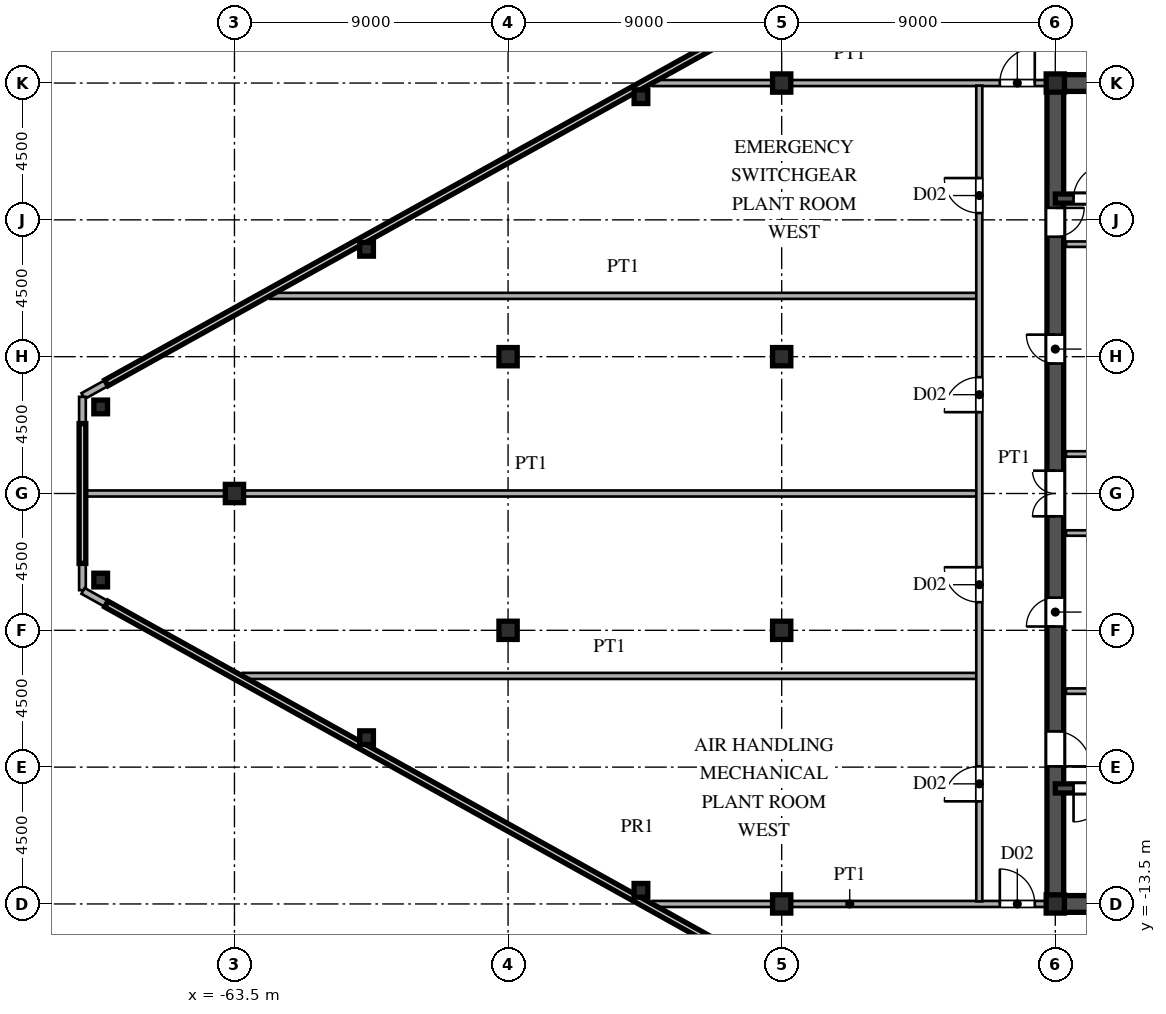
"""IFC4 building model, lengths in metres.
Left out: names, types, materials, properties, quantities, classifications, styles, units other than length and angle.
Written with IfcOpenShell. Run it as: python <this file> out.ifc"""

import sys

from ifc_helpers import new_model, si_unit, direction, frame, frame_2d, origin, origin_2d, place, context, subcontext, project, spatial, rectangle, hollow_rectangle, i_section, extrude, source, transform, mapped, element, fill, save


model = new_model("IFC4")
c1 = context("Model", 3, precision=1e-05, world=origin(), true_north=direction((0.0, 1.0)))
c2 = subcontext(c1, "Body", "Model", "MODEL_VIEW")
j1 = project(units=[si_unit("LENGTHUNIT", "METRE"), si_unit("PLANEANGLEUNIT", "RADIAN")], contexts=[c1])
p1 = place(None, origin())
s1 = spatial("IfcSite", under=j1, at=p1, CompositionType="ELEMENT")
p2 = place(p1, origin())
s2 = spatial("IfcBuilding", under=s1, at=p2, CompositionType="ELEMENT")
p3 = place(p2, frame((0.0, 0.0, 162.0)))
s3 = spatial("IfcBuildingStorey", under=s2, at=p3, CompositionType="ELEMENT", Elevation=162.0)
m1 = source(origin(), c2, "Body", "SweptSolid", [
    extrude(i_section(OverallWidth=0.6, OverallDepth=0.6, WebThickness=0.025, FlangeThickness=0.04, at=origin_2d()), origin(), (0.0, 0.0, 1.0), 5.1),
])
for number, where, z_axis, x_axis in (
    (1, (-36.5, -13.5, 0.0), (0.0, 0.0, 1.0), (1.0, 0.0, 0.0)),
    (2, (-36.5, 13.5, 0.0), (0.0, 0.0, 1.0), (1.0, 0.0, 0.0)),
    (3, (-45.5, -13.5, 0.0), (0.0, 0.0, 1.0), (1.0, 0.0, 0.0)),
    (4, (-45.5, -4.5, 0.0), (0.0, 0.0, 1.0), (1.0, 0.0, 0.0)),
    (5, (-45.5, 4.5, 0.0), (0.0, 0.0, 1.0), (1.0, 0.0, 0.0)),
    (6, (-45.5, 13.5, 0.0), (0.0, 0.0, 1.0), (1.0, 0.0, 0.0)),
    (7, (-54.5, -4.5, 0.0), (0.0, 0.0, 1.0), (1.0, 0.0, 0.0)),
    (8, (-54.5, 4.5, 0.0), (0.0, 0.0, 1.0), (1.0, 0.0, 0.0)),
    (9, (-63.5, 0.0, 0.0), (0.0, 0.0, 1.0), (1.0, 0.0, 0.0)),
):
    element("IfcColumn", number, at=place(p3, frame(where, z_axis=z_axis, x_axis=x_axis)), inside=s3, PredefinedType="COLUMN", context=c2, shape_type="MappedRepresentation", body=[
        mapped(m1, transform((0.0, 0.0, 0.0), scale=1.0)),
    ])
m2 = source(origin(), c2, "Body", "SweptSolid", [
    extrude(hollow_rectangle(XDim=0.45, YDim=0.45, WallThickness=0.018, at=origin_2d()), origin(), (0.0, 0.0, 1.0), 5.1),
])
for number, where, z_axis, x_axis in (
    (10, (-67.9, 2.847, 0.0), (0.0, 0.0, 1.0), (1.0, 0.0, 0.0)),
    (11, (-67.9, -2.847, 0.0), (0.0, 0.0, 1.0), (1.0, 0.0, 0.0)),
    (12, (-50.129, -13.051, 0.0), (0.0, 0.0, 1.0), (1.0, 0.0, 0.0)),
    (13, (-59.155, -8.031, 0.0), (0.0, 0.0, 1.0), (1.0, 0.0, 0.0)),
    (14, (-50.129, 13.051, 0.0), (0.0, 0.0, 1.0), (1.0, 0.0, 0.0)),
    (15, (-59.155, 8.031, 0.0), (0.0, 0.0, 1.0), (1.0, 0.0, 0.0)),
):
    element("IfcColumn", number, at=place(p3, frame(where, z_axis=z_axis, x_axis=x_axis)), inside=s3, PredefinedType="COLUMN", context=c2, shape_type="MappedRepresentation", body=[
        mapped(m2, transform((0.0, 0.0, 0.0), scale=1.0)),
    ])
p4 = place(p3, frame((-32.018, 23.49, 0.0), z_axis=(0.0, 0.0, 1.0), x_axis=(-0.873930586172, -0.486050748947, 0.0)))
e16 = element("IfcWall", 16, at=p4, inside=s3, PredefinedType="PARAPET", context=c2, shape_type="SweptSolid", body=[
    extrude(rectangle(XDim=41.725, YDim=0.22, at=frame_2d((20.863, 0.0))), origin(), (0.0, 0.0, 1.0), 1.25),
])
p5 = place(p3, frame((-68.5, 3.18, 0.0), z_axis=(0.0, 0.0, 1.0), x_axis=(0.0, -1.0, 0.0)))
e17 = element("IfcWall", 17, at=p5, inside=s3, PredefinedType="PARAPET", context=c2, shape_type="SweptSolid", body=[
    extrude(rectangle(XDim=6.36, YDim=0.22, at=frame_2d((3.18, 0.0))), origin(), (0.0, 0.0, 1.0), 1.25),
])
p6 = place(p3, frame((-68.482, -3.21, 0.0), z_axis=(0.0, 0.0, 1.0), x_axis=(0.873930586172, -0.486050748947, 0.0)))
e18 = element("IfcWall", 18, at=p6, inside=s3, PredefinedType="PARAPET", context=c2, shape_type="SweptSolid", body=[
    extrude(rectangle(XDim=41.725, YDim=0.22, at=frame_2d((20.863, 0.0))), origin(), (0.0, 0.0, 1.0), 1.25),
])
for number, where, z_axis, x_axis in (
    (19, (-36.5, -13.5, 0.0), (0.0, 0.0, 1.0), (1.0, 0.0, 0.0)),
    (20, (-36.5, 13.5, 0.0), (0.0, 0.0, 1.0), (1.0, 0.0, 0.0)),
):
    element("IfcWall", number, at=place(p3, frame(where, z_axis=z_axis, x_axis=x_axis)), inside=s3, PredefinedType="SHEAR", context=c2, shape_type="SweptSolid", body=[
        extrude(rectangle(XDim=9.0, YDim=0.55, at=frame_2d((4.5, 0.0))), origin(), (0.0, 0.0, 1.0), 4.88),
    ])
p7 = place(p3, frame((-36.5, -13.65, 0.0), z_axis=(0.0, 0.0, 1.0), x_axis=(0.0, 1.0, 0.0)))
e21 = element("IfcWall", 21, at=p7, inside=s3, PredefinedType="SHEAR", context=c2, shape_type="SweptSolid", body=[
    extrude(rectangle(XDim=7.15, YDim=0.55, at=frame_2d((3.575, 0.0))), origin(), (0.0, 0.0, 1.0), 4.88),
])
p8 = place(p7, frame((4.675, 0.0, 0.0)))
e22 = element("IfcOpeningElement", 22, at=p8, cuts=e21, PredefinedType="OPENING", context=c2, shape_type="SweptSolid", body=[
    extrude(rectangle(XDim=1.15, YDim=2.2, at=frame_2d((0.575, 1.1))), frame((0.0, 0.285, 0.0), z_axis=(0.0, -1.0, 0.0), x_axis=(1.0, 0.0, 0.0)), (0.0, 0.0, 1.0), 0.57),
])
p9 = place(p3, frame((-36.5, -1.3, 0.0), z_axis=(0.0, 0.0, 1.0), x_axis=(0.0, 1.0, 0.0)))
e23 = element("IfcWall", 23, at=p9, inside=s3, PredefinedType="SHEAR", context=c2, shape_type="SweptSolid", body=[
    extrude(rectangle(XDim=2.6, YDim=0.55, at=frame_2d((1.3, 0.0))), origin(), (0.0, 0.0, 1.0), 4.88),
])
p10 = place(p9, frame((0.55, 0.0, 0.0)))
e24 = element("IfcOpeningElement", 24, at=p10, cuts=e23, PredefinedType="OPENING", context=c2, shape_type="SweptSolid", body=[
    extrude(rectangle(XDim=1.5, YDim=2.3, at=frame_2d((0.75, 1.15))), frame((0.0, 0.285, 0.0), z_axis=(0.0, -1.0, 0.0), x_axis=(1.0, 0.0, 0.0)), (0.0, 0.0, 1.0), 0.57),
])
p11 = place(p3, frame((-36.5, 8.2, 0.0), z_axis=(0.0, 0.0, 1.0), x_axis=(0.0, 1.0, 0.0)))
e25 = element("IfcWall", 25, at=p11, inside=s3, PredefinedType="SHEAR", context=c2, shape_type="SweptSolid", body=[
    extrude(rectangle(XDim=5.45, YDim=0.55, at=frame_2d((2.725, 0.0))), origin(), (0.0, 0.0, 1.0), 4.88),
])
p12 = place(p11, frame((0.245, 0.0, 0.0)))
e26 = element("IfcOpeningElement", 26, at=p12, cuts=e25, PredefinedType="OPENING", context=c2, shape_type="SweptSolid", body=[
    extrude(rectangle(XDim=0.95, YDim=2.15, at=frame_2d((0.475, 1.075))), frame((0.0, 0.285, 0.0), z_axis=(0.0, -1.0, 0.0), x_axis=(1.0, 0.0, 0.0)), (0.0, 0.0, 1.0), 0.57),
])
p13 = place(p3, frame((-36.5, -6.5, 0.0), z_axis=(0.0, 0.0, 1.0), x_axis=(0.0, 1.0, 0.0)))
e27 = element("IfcWall", 27, at=p13, inside=s3, PredefinedType="SHEAR", context=c2, shape_type="SweptSolid", body=[
    extrude(rectangle(XDim=5.2, YDim=0.55, at=frame_2d((2.6, 0.0))), origin(), (0.0, 0.0, 1.0), 4.88),
])
p14 = place(p13, frame((2.125, 0.0, 0.0)))
e28 = element("IfcOpeningElement", 28, at=p14, cuts=e27, PredefinedType="OPENING", context=c2, shape_type="SweptSolid", body=[
    extrude(rectangle(XDim=0.95, YDim=2.15, at=frame_2d((0.475, 1.075))), frame((0.0, 0.285, 0.0), z_axis=(0.0, -1.0, 0.0), x_axis=(1.0, 0.0, 0.0)), (0.0, 0.0, 1.0), 0.57),
])
p15 = place(p3, frame((-36.5, 1.3, 0.0), z_axis=(0.0, 0.0, 1.0), x_axis=(0.0, 1.0, 0.0)))
e29 = element("IfcWall", 29, at=p15, inside=s3, PredefinedType="SHEAR", context=c2, shape_type="SweptSolid", body=[
    extrude(rectangle(XDim=6.9, YDim=0.55, at=frame_2d((3.45, 0.0))), origin(), (0.0, 0.0, 1.0), 4.88),
])
p16 = place(p15, frame((2.975, 0.0, 0.0)))
e30 = element("IfcOpeningElement", 30, at=p16, cuts=e29, PredefinedType="OPENING", context=c2, shape_type="SweptSolid", body=[
    extrude(rectangle(XDim=0.95, YDim=2.15, at=frame_2d((0.475, 1.075))), frame((0.0, 0.285, 0.0), z_axis=(0.0, -1.0, 0.0), x_axis=(1.0, 0.0, 0.0)), (0.0, 0.0, 1.0), 0.57),
])
p17 = place(p3, frame((-36.5, -9.7, 0.0), z_axis=(0.0, 0.0, 1.0), x_axis=(1.0, 0.0, 0.0)))
e31 = element("IfcWall", 31, at=p17, inside=s3, PredefinedType="SHEAR", context=c2, shape_type="SweptSolid", body=[
    extrude(rectangle(XDim=9.0, YDim=0.3, at=frame_2d((4.5, 0.0))), origin(), (0.0, 0.0, 1.0), 4.88),
])
p18 = place(p17, frame((0.6, 0.0, 0.0)))
e32 = element("IfcOpeningElement", 32, at=p18, cuts=e31, PredefinedType="OPENING", context=c2, shape_type="SweptSolid", body=[
    extrude(rectangle(XDim=1.1, YDim=2.2, at=frame_2d((0.55, 1.1))), frame((0.0, 0.16, 0.0), z_axis=(0.0, -1.0, 0.0), x_axis=(1.0, 0.0, 0.0)), (0.0, 0.0, 1.0), 0.32),
])
p19 = place(p3, frame((-36.5, 9.7, 0.0), z_axis=(0.0, 0.0, 1.0), x_axis=(1.0, 0.0, 0.0)))
e33 = element("IfcWall", 33, at=p19, inside=s3, PredefinedType="SHEAR", context=c2, shape_type="SweptSolid", body=[
    extrude(rectangle(XDim=9.0, YDim=0.3, at=frame_2d((4.5, 0.0))), origin(), (0.0, 0.0, 1.0), 4.88),
])
p20 = place(p19, frame((0.6, 0.0, 0.0)))
e34 = element("IfcOpeningElement", 34, at=p20, cuts=e33, PredefinedType="OPENING", context=c2, shape_type="SweptSolid", body=[
    extrude(rectangle(XDim=1.1, YDim=2.2, at=frame_2d((0.55, 1.1))), frame((0.0, 0.16, 0.0), z_axis=(0.0, -1.0, 0.0), x_axis=(1.0, 0.0, 0.0)), (0.0, 0.0, 1.0), 0.32),
])
for number, where, z_axis, x_axis in (
    (35, (-36.15, -6.5, 0.0), (0.0, 0.0, 1.0), (1.0, 0.0, 0.0)),
    (36, (-36.15, 8.2, 0.0), (0.0, 0.0, 1.0), (1.0, 0.0, 0.0)),
):
    element("IfcWall", number, at=place(p3, frame(where, z_axis=z_axis, x_axis=x_axis)), inside=s3, PredefinedType="PARTITIONING", context=c2, shape_type="SweptSolid", body=[
        extrude(rectangle(XDim=5.7, YDim=0.18, at=frame_2d((2.85, 0.0))), origin(), (0.0, 0.0, 1.0), 4.88),
    ])
for number, where, z_axis, x_axis in (
    (37, (-36.15, -1.3, 0.0), (0.0, 0.0, 1.0), (1.0, 0.0, 0.0)),
    (38, (-36.15, 1.3, 0.0), (0.0, 0.0, 1.0), (1.0, 0.0, 0.0)),
):
    element("IfcWall", number, at=place(p3, frame(where, z_axis=z_axis, x_axis=x_axis)), inside=s3, PredefinedType="PARTITIONING", context=c2, shape_type="SweptSolid", body=[
        extrude(rectangle(XDim=2.95, YDim=0.18, at=frame_2d((1.475, 0.0))), origin(), (0.0, 0.0, 1.0), 4.88),
    ])
p21 = place(p3, frame((-49.744, -13.5, 0.0), z_axis=(0.0, 0.0, 1.0), x_axis=(1.0, 0.0, 0.0)))
e39 = element("IfcWall", 39, at=p21, inside=s3, PredefinedType="PARTITIONING", context=c2, shape_type="SweptSolid", body=[
    extrude(rectangle(XDim=2.156, YDim=0.2, at=frame_2d((1.078, 0.0))), origin(), (0.0, 0.0, 1.0), 4.88),
])
p22 = place(p3, frame((-47.587, -13.5, 0.0), z_axis=(0.0, 0.0, 1.0), x_axis=(1.0, 0.0, 0.0)))
e40 = element("IfcWall", 40, at=p22, inside=s3, PredefinedType="PARTITIONING", context=c2, shape_type="SweptSolid", body=[
    extrude(rectangle(XDim=10.807, YDim=0.2, at=frame_2d((5.404, 0.0))), origin(), (0.0, 0.0, 1.0), 4.28),
])
p23 = place(p22, frame((9.262, 0.0, 0.0)))
e41 = element("IfcOpeningElement", 41, at=p23, cuts=e40, PredefinedType="OPENING", context=c2, shape_type="SweptSolid", body=[
    extrude(rectangle(XDim=1.15, YDim=2.2, at=frame_2d((0.575, 1.1))), frame((0.0, 0.11, 0.0), z_axis=(0.0, -1.0, 0.0), x_axis=(1.0, 0.0, 0.0)), (0.0, 0.0, 1.0), 0.22),
])
p24 = place(p3, frame((-63.229, -6.0, 0.0), z_axis=(0.0, 0.0, 1.0), x_axis=(1.0, 0.0, 0.0)))
e42 = element("IfcWall", 42, at=p24, inside=s3, PredefinedType="PARTITIONING", context=c2, shape_type="SweptSolid", body=[
    extrude(rectangle(XDim=24.144, YDim=0.2, at=frame_2d((12.072, 0.0))), origin(), (0.0, 0.0, 1.0), 4.88),
])
p25 = place(p3, frame((-68.385, 0.0, 0.0), z_axis=(0.0, 0.0, 1.0), x_axis=(1.0, 0.0, 0.0)))
e43 = element("IfcWall", 43, at=p25, inside=s3, PredefinedType="PARTITIONING", context=c2, shape_type="SweptSolid", body=[
    extrude(rectangle(XDim=29.3, YDim=0.2, at=frame_2d((14.65, 0.0))), origin(), (0.0, 0.0, 1.0), 4.88),
])
p26 = place(p3, frame((-62.33, 6.5, 0.0), z_axis=(0.0, 0.0, 1.0), x_axis=(1.0, 0.0, 0.0)))
e44 = element("IfcWall", 44, at=p26, inside=s3, PredefinedType="PARTITIONING", context=c2, shape_type="SweptSolid", body=[
    extrude(rectangle(XDim=23.245, YDim=0.2, at=frame_2d((11.623, 0.0))), origin(), (0.0, 0.0, 1.0), 4.88),
])
p27 = place(p3, frame((-49.744, 13.5, 0.0), z_axis=(0.0, 0.0, 1.0), x_axis=(1.0, 0.0, 0.0)))
e45 = element("IfcWall", 45, at=p27, inside=s3, PredefinedType="PARTITIONING", context=c2, shape_type="SweptSolid", body=[
    extrude(rectangle(XDim=2.156, YDim=0.2, at=frame_2d((1.078, 0.0))), origin(), (0.0, 0.0, 1.0), 4.88),
])
p28 = place(p3, frame((-47.587, 13.5, 0.0), z_axis=(0.0, 0.0, 1.0), x_axis=(1.0, 0.0, 0.0)))
e46 = element("IfcWall", 46, at=p28, inside=s3, PredefinedType="PARTITIONING", context=c2, shape_type="SweptSolid", body=[
    extrude(rectangle(XDim=10.807, YDim=0.2, at=frame_2d((5.404, 0.0))), origin(), (0.0, 0.0, 1.0), 4.28),
])
p29 = place(p28, frame((9.262, 0.0, 0.0)))
e47 = element("IfcOpeningElement", 47, at=p29, cuts=e46, PredefinedType="OPENING", context=c2, shape_type="SweptSolid", body=[
    extrude(rectangle(XDim=1.15, YDim=2.2, at=frame_2d((0.575, 1.1))), frame((0.0, 0.11, 0.0), z_axis=(0.0, -1.0, 0.0), x_axis=(1.0, 0.0, 0.0)), (0.0, 0.0, 1.0), 0.22),
])
p30 = place(p3, frame((-39.0, -13.415, 0.0), z_axis=(0.0, 0.0, 1.0), x_axis=(0.0, 1.0, 0.0)))
e48 = element("IfcWall", 48, at=p30, inside=s3, PredefinedType="PARTITIONING", context=c2, shape_type="SweptSolid", body=[
    extrude(rectangle(XDim=26.83, YDim=0.2, at=frame_2d((13.415, 0.0))), origin(), (0.0, 0.0, 1.0), 4.88),
])
p31 = place(p30, frame((3.29, 0.0, 0.0)))
e49 = element("IfcOpeningElement", 49, at=p31, cuts=e48, PredefinedType="OPENING", context=c2, shape_type="SweptSolid", body=[
    extrude(rectangle(XDim=1.15, YDim=2.2, at=frame_2d((0.575, 1.1))), frame((0.0, 0.11, 0.0), z_axis=(0.0, -1.0, 0.0), x_axis=(1.0, 0.0, 0.0)), (0.0, 0.0, 1.0), 0.22),
])
p32 = place(p30, frame((9.84, 0.0, 0.0)))
e50 = element("IfcOpeningElement", 50, at=p32, cuts=e48, PredefinedType="OPENING", context=c2, shape_type="SweptSolid", body=[
    extrude(rectangle(XDim=1.15, YDim=2.2, at=frame_2d((0.575, 1.1))), frame((0.0, 0.11, 0.0), z_axis=(0.0, -1.0, 0.0), x_axis=(1.0, 0.0, 0.0)), (0.0, 0.0, 1.0), 0.22),
])
p33 = place(p30, frame((16.09, 0.0, 0.0)))
e51 = element("IfcOpeningElement", 51, at=p33, cuts=e48, PredefinedType="OPENING", context=c2, shape_type="SweptSolid", body=[
    extrude(rectangle(XDim=1.15, YDim=2.2, at=frame_2d((0.575, 1.1))), frame((0.0, 0.11, 0.0), z_axis=(0.0, -1.0, 0.0), x_axis=(1.0, 0.0, 0.0)), (0.0, 0.0, 1.0), 0.22),
])
p34 = place(p30, frame((22.64, 0.0, 0.0)))
e52 = element("IfcOpeningElement", 52, at=p34, cuts=e48, PredefinedType="OPENING", context=c2, shape_type="SweptSolid", body=[
    extrude(rectangle(XDim=1.15, YDim=2.2, at=frame_2d((0.575, 1.1))), frame((0.0, 0.11, 0.0), z_axis=(0.0, -1.0, 0.0), x_axis=(1.0, 0.0, 0.0)), (0.0, 0.0, 1.0), 0.22),
])
m3 = source(origin(), c2, "Body", "SweptSolid", [
    extrude(rectangle(XDim=1.15, YDim=2.2, at=frame_2d((0.575, 1.1))), frame((0.0, 0.025, 0.0), z_axis=(0.0, -1.0, 0.0), x_axis=(1.0, 0.0, 0.0)), (0.0, 0.0, 1.0), 0.05),
])
p35 = place(p8, frame((1.15, 0.0, 0.0), z_axis=(0.0, 0.0, 1.0), x_axis=(-1.0, 0.0, 0.0)))
e53 = element("IfcDoor", 53, at=p35, inside=s3, OperationType="SINGLE_SWING_LEFT", PredefinedType="DOOR", context=c2, shape_type="MappedRepresentation", body=[
    mapped(m3, transform((0.0, 0.0, 0.0), scale=1.0)),
])
fill(e22, e53)
m4 = source(origin(), c2, "Body", "SweptSolid", [
    extrude(rectangle(XDim=1.5, YDim=2.3, at=frame_2d((0.75, 1.15))), frame((0.0, 0.025, 0.0), z_axis=(0.0, -1.0, 0.0), x_axis=(1.0, 0.0, 0.0)), (0.0, 0.0, 1.0), 0.05),
])
p36 = place(p10, origin())
e54 = element("IfcDoor", 54, at=p36, inside=s3, OperationType="DOUBLE_SWING_LEFT", PredefinedType="DOOR", context=c2, shape_type="MappedRepresentation", body=[
    mapped(m4, transform((0.0, 0.0, 0.0), scale=1.0)),
])
fill(e24, e54)
m5 = source(origin(), c2, "Body", "SweptSolid", [
    extrude(rectangle(XDim=0.95, YDim=2.15, at=frame_2d((0.475, 1.075))), frame((0.0, 0.025, 0.0), z_axis=(0.0, -1.0, 0.0), x_axis=(1.0, 0.0, 0.0)), (0.0, 0.0, 1.0), 0.05),
])
p37 = place(p12, frame((0.95, 0.0, 0.0), z_axis=(0.0, 0.0, 1.0), x_axis=(-1.0, 0.0, 0.0)))
e55 = element("IfcDoor", 55, at=p37, inside=s3, OperationType="SINGLE_SWING_RIGHT", PredefinedType="DOOR", context=c2, shape_type="MappedRepresentation", body=[
    mapped(m5, transform((0.0, 0.0, 0.0), scale=1.0)),
])
fill(e26, e55)
p38 = place(p14, origin())
e56 = element("IfcDoor", 56, at=p38, inside=s3, OperationType="SINGLE_SWING_LEFT", PredefinedType="DOOR", context=c2, shape_type="MappedRepresentation", body=[
    mapped(m5, transform((0.0, 0.0, 0.0), scale=1.0)),
])
fill(e28, e56)
p39 = place(p16, origin())
e57 = element("IfcDoor", 57, at=p39, inside=s3, OperationType="SINGLE_SWING_RIGHT", PredefinedType="DOOR", context=c2, shape_type="MappedRepresentation", body=[
    mapped(m5, transform((0.0, 0.0, 0.0), scale=1.0)),
])
fill(e30, e57)
m6 = source(origin(), c2, "Body", "SweptSolid", [
    extrude(rectangle(XDim=1.1, YDim=2.2, at=frame_2d((0.55, 1.1))), frame((0.0, 0.025, 0.0), z_axis=(0.0, -1.0, 0.0), x_axis=(1.0, 0.0, 0.0)), (0.0, 0.0, 1.0), 0.05),
])
p40 = place(p18, frame((1.1, 0.0, 0.0), z_axis=(0.0, 0.0, 1.0), x_axis=(-1.0, 0.0, 0.0)))
e58 = element("IfcDoor", 58, at=p40, inside=s3, OperationType="SINGLE_SWING_LEFT", PredefinedType="DOOR", context=c2, shape_type="MappedRepresentation", body=[
    mapped(m6, transform((0.0, 0.0, 0.0), scale=1.0)),
])
fill(e32, e58)
p41 = place(p20, origin())
e59 = element("IfcDoor", 59, at=p41, inside=s3, OperationType="SINGLE_SWING_RIGHT", PredefinedType="DOOR", context=c2, shape_type="MappedRepresentation", body=[
    mapped(m6, transform((0.0, 0.0, 0.0), scale=1.0)),
])
fill(e34, e59)
p42 = place(p23, origin())
e60 = element("IfcDoor", 60, at=p42, inside=s3, OperationType="SINGLE_SWING_LEFT", PredefinedType="DOOR", context=c2, shape_type="MappedRepresentation", body=[
    mapped(m3, transform((0.0, 0.0, 0.0), scale=1.0)),
])
fill(e41, e60)
p43 = place(p29, origin())
e61 = element("IfcDoor", 61, at=p43, inside=s3, OperationType="SINGLE_SWING_RIGHT", PredefinedType="DOOR", context=c2, shape_type="MappedRepresentation", body=[
    mapped(m3, transform((0.0, 0.0, 0.0), scale=1.0)),
])
fill(e47, e61)
p44 = place(p31, origin())
e62 = element("IfcDoor", 62, at=p44, inside=s3, OperationType="SINGLE_SWING_LEFT", PredefinedType="DOOR", context=c2, shape_type="MappedRepresentation", body=[
    mapped(m3, transform((0.0, 0.0, 0.0), scale=1.0)),
])
fill(e49, e62)
p45 = place(p32, origin())
e63 = element("IfcDoor", 63, at=p45, inside=s3, OperationType="SINGLE_SWING_RIGHT", PredefinedType="DOOR", context=c2, shape_type="MappedRepresentation", body=[
    mapped(m3, transform((0.0, 0.0, 0.0), scale=1.0)),
])
fill(e50, e63)
p46 = place(p33, origin())
e64 = element("IfcDoor", 64, at=p46, inside=s3, OperationType="SINGLE_SWING_LEFT", PredefinedType="DOOR", context=c2, shape_type="MappedRepresentation", body=[
    mapped(m3, transform((0.0, 0.0, 0.0), scale=1.0)),
])
fill(e51, e64)
p47 = place(p34, origin())
e65 = element("IfcDoor", 65, at=p47, inside=s3, OperationType="SINGLE_SWING_RIGHT", PredefinedType="DOOR", context=c2, shape_type="MappedRepresentation", body=[
    mapped(m3, transform((0.0, 0.0, 0.0), scale=1.0)),
])
fill(e52, e65)
save(model, sys.argv[1])
